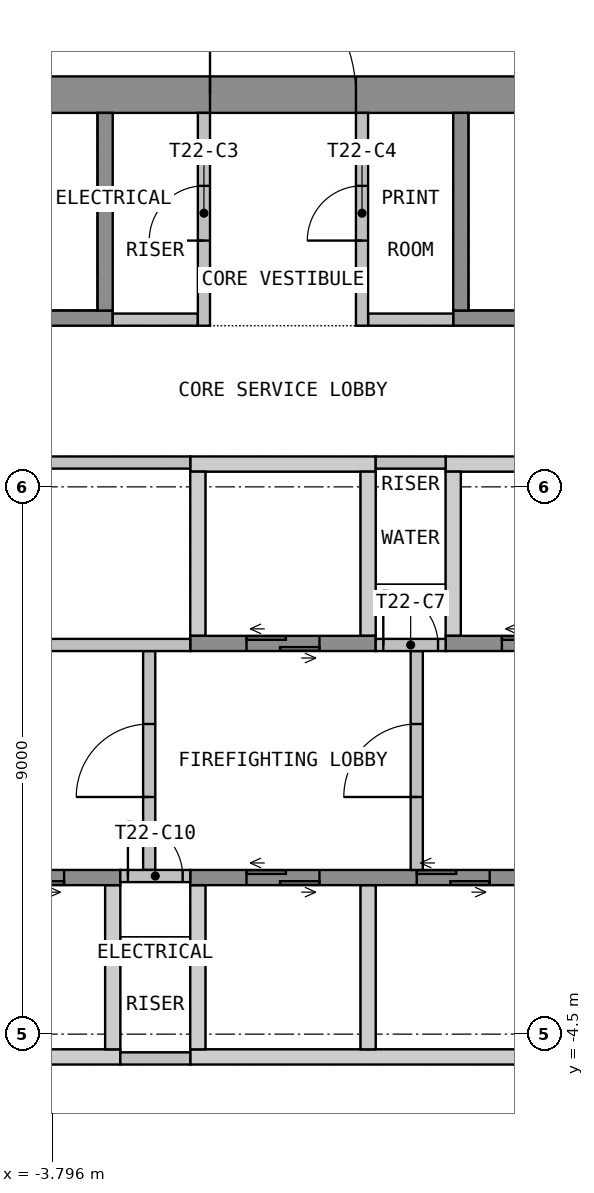
"""IFC4 building model, lengths in metres.
Left out: names, types, materials, properties, quantities, classifications, styles, units other than length and angle.
Written with IfcOpenShell. Run it as: python <this file> out.ifc"""

import sys

from ifc_helpers import new_model, si_unit, direction, frame, frame_2d, origin, place, context, subcontext, project, spatial, polyline, rectangle, outline, extrude, element, fill, save


model = new_model("IFC4")
c1 = context("Model", 3, precision=1e-05, world=origin(), true_north=direction((0.0, 1.0)))
c2 = subcontext(c1, "Body", "Model", "MODEL_VIEW")
j1 = project(units=[si_unit("LENGTHUNIT", "METRE"), si_unit("PLANEANGLEUNIT", "RADIAN")], contexts=[c1])
p1 = place(None, origin())
s1 = spatial("IfcSite", under=j1, at=p1, CompositionType="ELEMENT")
p2 = place(p1, origin())
s2 = spatial("IfcBuilding", under=s1, at=p2, CompositionType="ELEMENT")
p3 = place(p2, frame((0.0, 0.0, 298.2)))
s3 = spatial("IfcBuildingStorey", under=s2, at=p3, CompositionType="ELEMENT", Elevation=298.2)
p4 = place(p3, frame((-13.5, 10.95, 0.0), z_axis=(0.0, 0.0, 1.0), x_axis=(1.0, 0.0, 0.0)))
e1 = element("IfcWall", 1, at=p4, inside=s3, PredefinedType="SHEAR", context=c2, shape_type="SweptSolid", body=[
    extrude(rectangle(XDim=27.0, YDim=0.6, at=frame_2d((13.5, 0.0))), origin(), (0.0, 0.0, 1.0), 3.575),
])
p5 = place(p4, frame((12.3, 0.0, 0.0)))
e2 = element("IfcOpeningElement", 2, at=p5, cuts=e1, PredefinedType="OPENING", context=c2, shape_type="SweptSolid", body=[
    extrude(rectangle(XDim=2.4, YDim=2.1, at=frame_2d((1.2, 1.05))), frame((0.0, 0.31, 0.0), z_axis=(0.0, -1.0, 0.0), x_axis=(1.0, 0.0, 0.0)), (0.0, 0.0, 1.0), 0.62),
])
p6 = place(p4, frame((1.05, 0.0, 0.0)))
e3 = element("IfcOpeningElement", 3, at=p6, cuts=e1, PredefinedType="OPENING", context=c2, shape_type="SweptSolid", body=[
    extrude(rectangle(XDim=1.2, YDim=2.1, at=frame_2d((0.6, 1.05))), frame((0.0, 0.31, 0.0), z_axis=(0.0, -1.0, 0.0), x_axis=(1.0, 0.0, 0.0)), (0.0, 0.0, 1.0), 0.62),
])
p7 = place(p4, frame((24.75, 0.0, 0.0)))
e4 = element("IfcOpeningElement", 4, at=p7, cuts=e1, PredefinedType="OPENING", context=c2, shape_type="SweptSolid", body=[
    extrude(rectangle(XDim=1.2, YDim=2.1, at=frame_2d((0.6, 1.05))), frame((0.0, 0.31, 0.0), z_axis=(0.0, -1.0, 0.0), x_axis=(1.0, 0.0, 0.0)), (0.0, 0.0, 1.0), 0.62),
])
p8 = place(p3, origin())
e5 = element("IfcWall", 5, at=p8, inside=s3, PredefinedType="SHEAR", context=c2, shape_type="SweptSolid", body=[
    extrude(outline(polyline([(-1.525, 4.75), (1.525, 4.75), (1.525, 5.0), (-1.525, 5.0), (-1.525, 4.75)])), origin(), (0.0, 0.0, 1.0), 3.575),
])
p9 = place(p3, origin())
e6 = element("IfcWall", 6, at=p9, inside=s3, PredefinedType="SHEAR", context=c2, shape_type="SweptSolid", body=[
    extrude(outline(polyline([(2.675, 4.75), (8.525, 4.75), (8.525, 5.0), (2.675, 5.0), (2.675, 4.75)])), origin(), (0.0, 0.0, 1.0), 3.575),
])
p10 = place(p3, origin())
e7 = element("IfcWall", 7, at=p10, inside=s3, PredefinedType="SHEAR", context=c2, shape_type="SweptSolid", body=[
    extrude(outline(polyline([(-1.525, 2.05), (-1.275, 2.05), (-1.275, 4.75), (-1.525, 4.75), (-1.525, 2.05)])), origin(), (0.0, 0.0, 1.0), 3.575),
])
p11 = place(p3, origin())
e8 = element("IfcWall", 8, at=p11, inside=s3, PredefinedType="SHEAR", context=c2, shape_type="SweptSolid", body=[
    extrude(outline(polyline([(1.275, 2.05), (1.525, 2.05), (1.525, 4.75), (1.275, 4.75), (1.275, 2.05)])), origin(), (0.0, 0.0, 1.0), 3.575),
])
p12 = place(p3, origin())
e9 = element("IfcWall", 9, at=p12, inside=s3, PredefinedType="SHEAR", context=c2, shape_type="SweptSolid", body=[
    extrude(outline(polyline([(2.675, 2.05), (2.925, 2.05), (2.925, 4.75), (2.675, 4.75), (2.675, 2.05)])), origin(), (0.0, 0.0, 1.0), 3.575),
])
p13 = place(p3, frame((-1.525, 1.925, 0.0), z_axis=(0.0, 0.0, 1.0), x_axis=(1.0, 0.0, 0.0)))
e10 = element("IfcWall", 10, at=p13, inside=s3, PredefinedType="SHEAR", context=c2, shape_type="SweptSolid", body=[
    extrude(rectangle(XDim=3.05, YDim=0.25, at=frame_2d((1.525, 0.0))), origin(), (0.0, 0.0, 1.0), 3.575),
])
p14 = place(p13, frame((0.925, 0.0, 0.0)))
e11 = element("IfcOpeningElement", 11, at=p14, cuts=e10, PredefinedType="OPENING", context=c2, shape_type="SweptSolid", body=[
    extrude(rectangle(XDim=1.2, YDim=2.1, at=frame_2d((0.6, 1.05))), frame((0.0, 0.135, 0.0), z_axis=(0.0, -1.0, 0.0), x_axis=(1.0, 0.0, 0.0)), (0.0, 0.0, 1.0), 0.27),
])
p15 = place(p3, frame((2.675, 1.925, 0.0), z_axis=(0.0, 0.0, 1.0), x_axis=(1.0, 0.0, 0.0)))
e12 = element("IfcWall", 12, at=p15, inside=s3, PredefinedType="SHEAR", context=c2, shape_type="SweptSolid", body=[
    extrude(rectangle(XDim=5.85, YDim=0.25, at=frame_2d((2.925, 0.0))), origin(), (0.0, 0.0, 1.0), 3.575),
])
p16 = place(p15, frame((0.925, 0.0, 0.0)))
e13 = element("IfcOpeningElement", 13, at=p16, cuts=e12, PredefinedType="OPENING", context=c2, shape_type="SweptSolid", body=[
    extrude(rectangle(XDim=1.2, YDim=2.1, at=frame_2d((0.6, 1.05))), frame((0.0, 0.135, 0.0), z_axis=(0.0, -1.0, 0.0), x_axis=(1.0, 0.0, 0.0)), (0.0, 0.0, 1.0), 0.27),
])
p17 = place(p15, frame((3.725, 0.0, 0.0)))
e14 = element("IfcOpeningElement", 14, at=p17, cuts=e12, PredefinedType="OPENING", context=c2, shape_type="SweptSolid", body=[
    extrude(rectangle(XDim=1.2, YDim=2.1, at=frame_2d((0.6, 1.05))), frame((0.0, 0.135, 0.0), z_axis=(0.0, -1.0, 0.0), x_axis=(1.0, 0.0, 0.0)), (0.0, 0.0, 1.0), 0.27),
])
p18 = place(p3, origin())
e15 = element("IfcWall", 15, at=p18, inside=s3, PredefinedType="SHEAR", context=c2, shape_type="SweptSolid", body=[
    extrude(outline(polyline([(-11.325, -5.0), (-2.675, -5.0), (-2.675, -4.75), (-11.325, -4.75), (-11.325, -5.0)])), origin(), (0.0, 0.0, 1.0), 3.575),
])
p19 = place(p3, origin())
e16 = element("IfcWall", 16, at=p19, inside=s3, PredefinedType="SHEAR", context=c2, shape_type="SweptSolid", body=[
    extrude(outline(polyline([(-1.525, -5.0), (4.325, -5.0), (4.325, -4.75), (-1.525, -4.75), (-1.525, -5.0)])), origin(), (0.0, 0.0, 1.0), 3.575),
])
p20 = place(p3, origin())
e17 = element("IfcWall", 17, at=p20, inside=s3, PredefinedType="SHEAR", context=c2, shape_type="SweptSolid", body=[
    extrude(outline(polyline([(-2.925, -4.75), (-2.675, -4.75), (-2.675, -2.05), (-2.925, -2.05), (-2.925, -4.75)])), origin(), (0.0, 0.0, 1.0), 3.575),
])
p21 = place(p3, origin())
e18 = element("IfcWall", 18, at=p21, inside=s3, PredefinedType="SHEAR", context=c2, shape_type="SweptSolid", body=[
    extrude(outline(polyline([(-1.525, -4.75), (-1.275, -4.75), (-1.275, -2.05), (-1.525, -2.05), (-1.525, -4.75)])), origin(), (0.0, 0.0, 1.0), 3.575),
])
p22 = place(p3, origin())
e19 = element("IfcWall", 19, at=p22, inside=s3, PredefinedType="SHEAR", context=c2, shape_type="SweptSolid", body=[
    extrude(outline(polyline([(1.275, -4.75), (1.525, -4.75), (1.525, -2.05), (1.275, -2.05), (1.275, -4.75)])), origin(), (0.0, 0.0, 1.0), 3.575),
])
p23 = place(p3, frame((-11.325, -1.925, 0.0), z_axis=(0.0, 0.0, 1.0), x_axis=(1.0, 0.0, 0.0)))
e20 = element("IfcWall", 20, at=p23, inside=s3, PredefinedType="SHEAR", context=c2, shape_type="SweptSolid", body=[
    extrude(rectangle(XDim=8.65, YDim=0.25, at=frame_2d((4.325, 0.0))), origin(), (0.0, 0.0, 1.0), 3.575),
])
p24 = place(p23, frame((0.925, 0.0, 0.0)))
e21 = element("IfcOpeningElement", 21, at=p24, cuts=e20, PredefinedType="OPENING", context=c2, shape_type="SweptSolid", body=[
    extrude(rectangle(XDim=1.2, YDim=2.1, at=frame_2d((0.6, 1.05))), frame((0.0, 0.135, 0.0), z_axis=(0.0, -1.0, 0.0), x_axis=(1.0, 0.0, 0.0)), (0.0, 0.0, 1.0), 0.27),
])
p25 = place(p23, frame((3.725, 0.0, 0.0)))
e22 = element("IfcOpeningElement", 22, at=p25, cuts=e20, PredefinedType="OPENING", context=c2, shape_type="SweptSolid", body=[
    extrude(rectangle(XDim=1.2, YDim=2.1, at=frame_2d((0.6, 1.05))), frame((0.0, 0.135, 0.0), z_axis=(0.0, -1.0, 0.0), x_axis=(1.0, 0.0, 0.0)), (0.0, 0.0, 1.0), 0.27),
])
p26 = place(p23, frame((6.525, 0.0, 0.0)))
e23 = element("IfcOpeningElement", 23, at=p26, cuts=e20, PredefinedType="OPENING", context=c2, shape_type="SweptSolid", body=[
    extrude(rectangle(XDim=1.2, YDim=2.1, at=frame_2d((0.6, 1.05))), frame((0.0, 0.135, 0.0), z_axis=(0.0, -1.0, 0.0), x_axis=(1.0, 0.0, 0.0)), (0.0, 0.0, 1.0), 0.27),
])
p27 = place(p3, frame((-1.525, -1.925, 0.0), z_axis=(0.0, 0.0, 1.0), x_axis=(1.0, 0.0, 0.0)))
e24 = element("IfcWall", 24, at=p27, inside=s3, PredefinedType="SHEAR", context=c2, shape_type="SweptSolid", body=[
    extrude(rectangle(XDim=5.85, YDim=0.25, at=frame_2d((2.925, 0.0))), origin(), (0.0, 0.0, 1.0), 3.575),
])
p28 = place(p27, frame((0.925, 0.0, 0.0)))
e25 = element("IfcOpeningElement", 25, at=p28, cuts=e24, PredefinedType="OPENING", context=c2, shape_type="SweptSolid", body=[
    extrude(rectangle(XDim=1.2, YDim=2.1, at=frame_2d((0.6, 1.05))), frame((0.0, 0.135, 0.0), z_axis=(0.0, -1.0, 0.0), x_axis=(1.0, 0.0, 0.0)), (0.0, 0.0, 1.0), 0.27),
])
p29 = place(p27, frame((3.725, 0.0, 0.0)))
e26 = element("IfcOpeningElement", 26, at=p29, cuts=e24, PredefinedType="OPENING", context=c2, shape_type="SweptSolid", body=[
    extrude(rectangle(XDim=1.2, YDim=2.1, at=frame_2d((0.6, 1.05))), frame((0.0, 0.135, 0.0), z_axis=(0.0, -1.0, 0.0), x_axis=(1.0, 0.0, 0.0)), (0.0, 0.0, 1.0), 0.27),
])
p30 = place(p3, frame((-2.2, -1.8, 0.0), z_axis=(0.0, 0.0, 1.0), x_axis=(0.0, 1.0, 0.0)))
e27 = element("IfcWall", 27, at=p30, inside=s3, PredefinedType="PARTITIONING", context=c2, shape_type="SweptSolid", body=[
    extrude(rectangle(XDim=3.6, YDim=0.2, at=frame_2d((1.8, 0.0))), origin(), (0.0, 0.0, 1.0), 3.575),
])
p31 = place(p30, frame((1.2, 0.0, 0.0)))
e28 = element("IfcOpeningElement", 28, at=p31, cuts=e27, PredefinedType="OPENING", context=c2, shape_type="SweptSolid", body=[
    extrude(rectangle(XDim=1.2, YDim=2.1, at=frame_2d((0.6, 1.05))), frame((0.0, 0.11, 0.0), z_axis=(0.0, -1.0, 0.0), x_axis=(1.0, 0.0, 0.0)), (0.0, 0.0, 1.0), 0.22),
])
p32 = place(p3, frame((2.2, -1.8, 0.0), z_axis=(0.0, 0.0, 1.0), x_axis=(0.0, 1.0, 0.0)))
e29 = element("IfcWall", 29, at=p32, inside=s3, PredefinedType="PARTITIONING", context=c2, shape_type="SweptSolid", body=[
    extrude(rectangle(XDim=3.6, YDim=0.2, at=frame_2d((1.8, 0.0))), origin(), (0.0, 0.0, 1.0), 3.575),
])
p33 = place(p32, frame((1.2, 0.0, 0.0)))
e30 = element("IfcOpeningElement", 30, at=p33, cuts=e29, PredefinedType="OPENING", context=c2, shape_type="SweptSolid", body=[
    extrude(rectangle(XDim=1.2, YDim=2.1, at=frame_2d((0.6, 1.05))), frame((0.0, 0.11, 0.0), z_axis=(0.0, -1.0, 0.0), x_axis=(1.0, 0.0, 0.0)), (0.0, 0.0, 1.0), 0.22),
])
p34 = place(p3, frame((-12.9, 7.275, 0.0), z_axis=(0.0, 0.0, 1.0), x_axis=(1.0, 0.0, 0.0)))
e31 = element("IfcWall", 31, at=p34, inside=s3, PredefinedType="SHEAR", context=c2, shape_type="SweptSolid", body=[
    extrude(rectangle(XDim=10.1, YDim=0.25, at=frame_2d((5.05, 0.0))), origin(), (0.0, 0.0, 1.0), 3.575),
])
p35 = place(p34, frame((0.45, 0.0, 0.0)))
e32 = element("IfcOpeningElement", 32, at=p35, cuts=e31, PredefinedType="OPENING", context=c2, shape_type="SweptSolid", body=[
    extrude(rectangle(XDim=1.2, YDim=2.1, at=frame_2d((0.6, 1.05))), frame((0.0, 0.135, 0.0), z_axis=(0.0, -1.0, 0.0), x_axis=(1.0, 0.0, 0.0)), (0.0, 0.0, 1.0), 0.27),
])
p36 = place(p3, frame((-2.925, 7.4, 0.0), z_axis=(0.0, 0.0, 1.0), x_axis=(0.0, 1.0, 0.0)))
e33 = element("IfcWall", 33, at=p36, inside=s3, PredefinedType="SHEAR", context=c2, shape_type="SweptSolid", body=[
    extrude(rectangle(XDim=3.25, YDim=0.25, at=frame_2d((1.625, 0.0))), origin(), (0.0, 0.0, 1.0), 3.575),
])
p37 = place(p3, frame((2.8, 7.275, 0.0), z_axis=(0.0, 0.0, 1.0), x_axis=(1.0, 0.0, 0.0)))
e34 = element("IfcWall", 34, at=p37, inside=s3, PredefinedType="SHEAR", context=c2, shape_type="SweptSolid", body=[
    extrude(rectangle(XDim=10.1, YDim=0.25, at=frame_2d((5.05, 0.0))), origin(), (0.0, 0.0, 1.0), 3.575),
])
p38 = place(p37, frame((8.45, 0.0, 0.0)))
e35 = element("IfcOpeningElement", 35, at=p38, cuts=e34, PredefinedType="OPENING", context=c2, shape_type="SweptSolid", body=[
    extrude(rectangle(XDim=1.2, YDim=2.1, at=frame_2d((0.6, 1.05))), frame((0.0, 0.135, 0.0), z_axis=(0.0, -1.0, 0.0), x_axis=(1.0, 0.0, 0.0)), (0.0, 0.0, 1.0), 0.27),
])
p39 = place(p3, frame((2.925, 7.4, 0.0), z_axis=(0.0, 0.0, 1.0), x_axis=(0.0, 1.0, 0.0)))
e36 = element("IfcWall", 36, at=p39, inside=s3, PredefinedType="SHEAR", context=c2, shape_type="SweptSolid", body=[
    extrude(rectangle(XDim=3.25, YDim=0.25, at=frame_2d((1.625, 0.0))), origin(), (0.0, 0.0, 1.0), 3.575),
])
for number, where, z_axis, x_axis in (
    (37, (-2.8, 7.25, 0.0), (0.0, 0.0, 1.0), (1.0, 0.0, 0.0)),
    (38, (1.4, 7.25, 0.0), (0.0, 0.0, 1.0), (1.0, 0.0, 0.0)),
):
    element("IfcWall", number, at=place(p3, frame(where, z_axis=z_axis, x_axis=x_axis)), inside=s3, PredefinedType="PARTITIONING", context=c2, shape_type="SweptSolid", body=[
        extrude(rectangle(XDim=1.4, YDim=0.2, at=frame_2d((0.7, 0.0))), origin(), (0.0, 0.0, 1.0), 3.575),
    ])
p40 = place(p3, frame((-1.3, 7.15, 0.0), z_axis=(0.0, 0.0, 1.0), x_axis=(0.0, 1.0, 0.0)))
e39 = element("IfcWall", 39, at=p40, inside=s3, PredefinedType="PARTITIONING", context=c2, shape_type="SweptSolid", body=[
    extrude(rectangle(XDim=3.5, YDim=0.2, at=frame_2d((1.75, 0.0))), origin(), (0.0, 0.0, 1.0), 3.575),
])
p41 = place(p40, frame((1.4, 0.0, 0.0)))
e40 = element("IfcOpeningElement", 40, at=p41, cuts=e39, PredefinedType="OPENING", context=c2, shape_type="SweptSolid", body=[
    extrude(rectangle(XDim=0.9, YDim=2.1, at=frame_2d((0.45, 1.05))), frame((0.0, 0.11, 0.0), z_axis=(0.0, -1.0, 0.0), x_axis=(1.0, 0.0, 0.0)), (0.0, 0.0, 1.0), 0.22),
])
p42 = place(p3, frame((1.3, 7.15, 0.0), z_axis=(0.0, 0.0, 1.0), x_axis=(0.0, 1.0, 0.0)))
e41 = element("IfcWall", 41, at=p42, inside=s3, PredefinedType="PARTITIONING", context=c2, shape_type="SweptSolid", body=[
    extrude(rectangle(XDim=3.5, YDim=0.2, at=frame_2d((1.75, 0.0))), origin(), (0.0, 0.0, 1.0), 3.575),
])
p43 = place(p42, frame((1.4, 0.0, 0.0)))
e42 = element("IfcOpeningElement", 42, at=p43, cuts=e41, PredefinedType="OPENING", context=c2, shape_type="SweptSolid", body=[
    extrude(rectangle(XDim=0.9, YDim=2.1, at=frame_2d((0.45, 1.05))), frame((0.0, 0.11, 0.0), z_axis=(0.0, -1.0, 0.0), x_axis=(1.0, 0.0, 0.0)), (0.0, 0.0, 1.0), 0.22),
])
p44 = place(p3, frame((-12.9, 1.9, 0.0), z_axis=(0.0, 0.0, 1.0), x_axis=(1.0, 0.0, 0.0)))
e43 = element("IfcWall", 43, at=p44, inside=s3, PredefinedType="PARTITIONING", context=c2, shape_type="SweptSolid", body=[
    extrude(rectangle(XDim=11.375, YDim=0.2, at=frame_2d((5.688, 0.0))), origin(), (0.0, 0.0, 1.0), 3.575),
])
p45 = place(p44, frame((1.256, 0.0, 0.0)))
e44 = element("IfcOpeningElement", 44, at=p45, cuts=e43, PredefinedType="OPENING", context=c2, shape_type="SweptSolid", body=[
    extrude(rectangle(XDim=0.9, YDim=2.1, at=frame_2d((0.45, 1.05))), frame((0.0, 0.11, 0.0), z_axis=(0.0, -1.0, 0.0), x_axis=(1.0, 0.0, 0.0)), (0.0, 0.0, 1.0), 0.22),
])
p46 = place(p44, frame((6.794, 0.0, 0.0)))
e45 = element("IfcOpeningElement", 45, at=p46, cuts=e43, PredefinedType="OPENING", context=c2, shape_type="SweptSolid", body=[
    extrude(rectangle(XDim=1.2, YDim=2.1, at=frame_2d((0.6, 1.05))), frame((0.0, 0.11, 0.0), z_axis=(0.0, -1.0, 0.0), x_axis=(1.0, 0.0, 0.0)), (0.0, 0.0, 1.0), 0.22),
])
p47 = place(p3, frame((-12.9, 4.9, 0.0), z_axis=(0.0, 0.0, 1.0), x_axis=(1.0, 0.0, 0.0)))
e46 = element("IfcWall", 46, at=p47, inside=s3, PredefinedType="PARTITIONING", context=c2, shape_type="SweptSolid", body=[
    extrude(rectangle(XDim=11.375, YDim=0.2, at=frame_2d((5.688, 0.0))), origin(), (0.0, 0.0, 1.0), 3.575),
])
p48 = place(p3, frame((1.525, 1.9, 0.0), z_axis=(0.0, 0.0, 1.0), x_axis=(1.0, 0.0, 0.0)))
e47 = element("IfcWall", 47, at=p48, inside=s3, PredefinedType="PARTITIONING", context=c2, shape_type="SweptSolid", body=[
    extrude(rectangle(XDim=1.15, YDim=0.2, at=frame_2d((0.575, 0.0))), origin(), (0.0, 0.0, 1.0), 3.575),
])
p49 = place(p48, frame((0.125, 0.0, 0.0)))
e48 = element("IfcOpeningElement", 48, at=p49, cuts=e47, PredefinedType="OPENING", context=c2, shape_type="SweptSolid", body=[
    extrude(rectangle(XDim=0.9, YDim=2.1, at=frame_2d((0.45, 1.05))), frame((0.0, 0.11, 0.0), z_axis=(0.0, -1.0, 0.0), x_axis=(1.0, 0.0, 0.0)), (0.0, 0.0, 1.0), 0.22),
])
p50 = place(p3, frame((1.525, 4.9, 0.0), z_axis=(0.0, 0.0, 1.0), x_axis=(1.0, 0.0, 0.0)))
e49 = element("IfcWall", 49, at=p50, inside=s3, PredefinedType="PARTITIONING", context=c2, shape_type="SweptSolid", body=[
    extrude(rectangle(XDim=1.15, YDim=0.2, at=frame_2d((0.575, 0.0))), origin(), (0.0, 0.0, 1.0), 3.575),
])
p51 = place(p3, frame((-2.675, -1.9, 0.0), z_axis=(0.0, 0.0, 1.0), x_axis=(1.0, 0.0, 0.0)))
e50 = element("IfcWall", 50, at=p51, inside=s3, PredefinedType="PARTITIONING", context=c2, shape_type="SweptSolid", body=[
    extrude(rectangle(XDim=1.15, YDim=0.2, at=frame_2d((0.575, 0.0))), origin(), (0.0, 0.0, 1.0), 3.575),
])
p52 = place(p51, frame((0.125, 0.0, 0.0)))
e51 = element("IfcOpeningElement", 51, at=p52, cuts=e50, PredefinedType="OPENING", context=c2, shape_type="SweptSolid", body=[
    extrude(rectangle(XDim=0.9, YDim=2.1, at=frame_2d((0.45, 1.05))), frame((0.0, 0.11, 0.0), z_axis=(0.0, -1.0, 0.0), x_axis=(1.0, 0.0, 0.0)), (0.0, 0.0, 1.0), 0.22),
])
p53 = place(p3, frame((-2.675, -4.9, 0.0), z_axis=(0.0, 0.0, 1.0), x_axis=(1.0, 0.0, 0.0)))
e52 = element("IfcWall", 52, at=p53, inside=s3, PredefinedType="PARTITIONING", context=c2, shape_type="SweptSolid", body=[
    extrude(rectangle(XDim=1.15, YDim=0.2, at=frame_2d((0.575, 0.0))), origin(), (0.0, 0.0, 1.0), 3.575),
])
p54 = place(p5, origin())
e53 = element("IfcDoor", 53, at=p54, inside=s3, OperationType="DOUBLE_DOOR_DOUBLE_SWING", PredefinedType="DOOR", context=c2, shape_type="SweptSolid", body=[
    extrude(rectangle(XDim=2.4, YDim=2.1, at=frame_2d((1.2, 1.05))), frame((0.0, 0.025, 0.0), z_axis=(0.0, -1.0, 0.0), x_axis=(1.0, 0.0, 0.0)), (0.0, 0.0, 1.0), 0.05),
])
fill(e2, e53)
p55 = place(p14, origin())
e54 = element("IfcDoor", 54, at=p55, inside=s3, OperationType="DOUBLE_DOOR_SLIDING", PredefinedType="DOOR", context=c2, shape_type="SweptSolid", body=[
    extrude(rectangle(XDim=1.2, YDim=2.1, at=frame_2d((0.6, 1.05))), frame((0.0, 0.025, 0.0), z_axis=(0.0, -1.0, 0.0), x_axis=(1.0, 0.0, 0.0)), (0.0, 0.0, 1.0), 0.05),
])
fill(e11, e54)
p56 = place(p16, origin())
e55 = element("IfcDoor", 55, at=p56, inside=s3, OperationType="DOUBLE_DOOR_SLIDING", PredefinedType="DOOR", context=c2, shape_type="SweptSolid", body=[
    extrude(rectangle(XDim=1.2, YDim=2.1, at=frame_2d((0.6, 1.05))), frame((0.0, 0.025, 0.0), z_axis=(0.0, -1.0, 0.0), x_axis=(1.0, 0.0, 0.0)), (0.0, 0.0, 1.0), 0.05),
])
fill(e13, e55)
p57 = place(p26, origin())
e56 = element("IfcDoor", 56, at=p57, inside=s3, OperationType="DOUBLE_DOOR_SLIDING", PredefinedType="DOOR", context=c2, shape_type="SweptSolid", body=[
    extrude(rectangle(XDim=1.2, YDim=2.1, at=frame_2d((0.6, 1.05))), frame((0.0, 0.025, 0.0), z_axis=(0.0, -1.0, 0.0), x_axis=(1.0, 0.0, 0.0)), (0.0, 0.0, 1.0), 0.05),
])
fill(e23, e56)
p58 = place(p28, origin())
e57 = element("IfcDoor", 57, at=p58, inside=s3, OperationType="DOUBLE_DOOR_SLIDING", PredefinedType="DOOR", context=c2, shape_type="SweptSolid", body=[
    extrude(rectangle(XDim=1.2, YDim=2.1, at=frame_2d((0.6, 1.05))), frame((0.0, 0.025, 0.0), z_axis=(0.0, -1.0, 0.0), x_axis=(1.0, 0.0, 0.0)), (0.0, 0.0, 1.0), 0.05),
])
fill(e25, e57)
p59 = place(p29, origin())
e58 = element("IfcDoor", 58, at=p59, inside=s3, OperationType="DOUBLE_DOOR_SLIDING", PredefinedType="DOOR", context=c2, shape_type="SweptSolid", body=[
    extrude(rectangle(XDim=1.2, YDim=2.1, at=frame_2d((0.6, 1.05))), frame((0.0, 0.025, 0.0), z_axis=(0.0, -1.0, 0.0), x_axis=(1.0, 0.0, 0.0)), (0.0, 0.0, 1.0), 0.05),
])
fill(e26, e58)
p60 = place(p31, origin())
e59 = element("IfcDoor", 59, at=p60, inside=s3, OperationType="SINGLE_SWING_LEFT", PredefinedType="DOOR", context=c2, shape_type="SweptSolid", body=[
    extrude(rectangle(XDim=1.2, YDim=2.1, at=frame_2d((0.6, 1.05))), frame((0.0, 0.025, 0.0), z_axis=(0.0, -1.0, 0.0), x_axis=(1.0, 0.0, 0.0)), (0.0, 0.0, 1.0), 0.05),
])
fill(e28, e59)
p61 = place(p33, origin())
e60 = element("IfcDoor", 60, at=p61, inside=s3, OperationType="SINGLE_SWING_LEFT", PredefinedType="DOOR", context=c2, shape_type="SweptSolid", body=[
    extrude(rectangle(XDim=1.2, YDim=2.1, at=frame_2d((0.6, 1.05))), frame((0.0, 0.025, 0.0), z_axis=(0.0, -1.0, 0.0), x_axis=(1.0, 0.0, 0.0)), (0.0, 0.0, 1.0), 0.05),
])
fill(e30, e60)
p62 = place(p41, origin())
e61 = element("IfcDoor", 61, at=p62, inside=s3, OperationType="SINGLE_SWING_LEFT", PredefinedType="DOOR", context=c2, shape_type="SweptSolid", body=[
    extrude(rectangle(XDim=0.9, YDim=2.1, at=frame_2d((0.45, 1.05))), frame((0.0, 0.025, 0.0), z_axis=(0.0, -1.0, 0.0), x_axis=(1.0, 0.0, 0.0)), (0.0, 0.0, 1.0), 0.05),
])
fill(e40, e61)
p63 = place(p43, origin())
e62 = element("IfcDoor", 62, at=p63, inside=s3, OperationType="SINGLE_SWING_LEFT", PredefinedType="DOOR", context=c2, shape_type="SweptSolid", body=[
    extrude(rectangle(XDim=0.9, YDim=2.1, at=frame_2d((0.45, 1.05))), frame((0.0, 0.025, 0.0), z_axis=(0.0, -1.0, 0.0), x_axis=(1.0, 0.0, 0.0)), (0.0, 0.0, 1.0), 0.05),
])
fill(e42, e62)
p64 = place(p49, origin())
e63 = element("IfcDoor", 63, at=p64, inside=s3, OperationType="SINGLE_SWING_LEFT", PredefinedType="DOOR", context=c2, shape_type="SweptSolid", body=[
    extrude(rectangle(XDim=0.9, YDim=2.1, at=frame_2d((0.45, 1.05))), frame((0.0, 0.025, 0.0), z_axis=(0.0, -1.0, 0.0), x_axis=(1.0, 0.0, 0.0)), (0.0, 0.0, 1.0), 0.05),
])
fill(e48, e63)
p65 = place(p52, origin())
e64 = element("IfcDoor", 64, at=p65, inside=s3, OperationType="SINGLE_SWING_LEFT", PredefinedType="DOOR", context=c2, shape_type="SweptSolid", body=[
    extrude(rectangle(XDim=0.9, YDim=2.1, at=frame_2d((0.45, 1.05))), frame((0.0, 0.025, 0.0), z_axis=(0.0, -1.0, 0.0), x_axis=(1.0, 0.0, 0.0)), (0.0, 0.0, 1.0), 0.05),
])
fill(e51, e64)
save(model, sys.argv[1])
